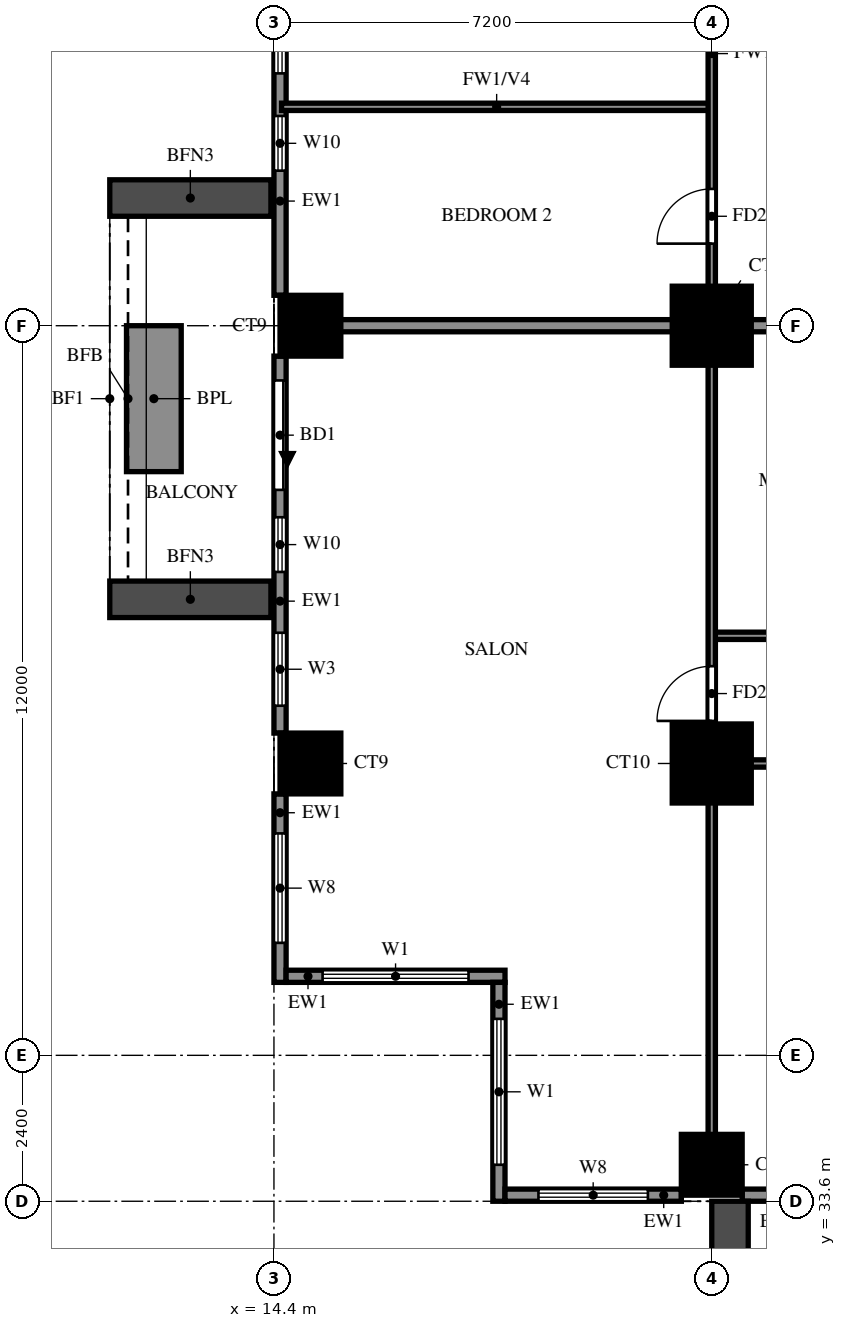
"""IFC4 building model, lengths in metres.
Left out: names, types, materials, properties, quantities, classifications, styles, units other than length and angle.
Written with IfcOpenShell. Run it as: python <this file> out.ifc"""

import sys

from ifc_helpers import new_model, si_unit, direction, frame, frame_2d, origin, origin_2d, place, context, subcontext, project, spatial, rectangle, extrude, source, transform, mapped, element, fill, save


model = new_model("IFC4")
c1 = context("Model", 3, precision=1e-05, world=origin(), true_north=direction((0.0, 1.0)))
c2 = subcontext(c1, "Body", "Model", "MODEL_VIEW")
j1 = project(units=[si_unit("LENGTHUNIT", "METRE"), si_unit("PLANEANGLEUNIT", "RADIAN")], contexts=[c1])
p1 = place(None, origin())
s1 = spatial("IfcSite", under=j1, at=p1, CompositionType="ELEMENT")
p2 = place(p1, origin())
s2 = spatial("IfcBuilding", under=s1, at=p2, CompositionType="ELEMENT")
p3 = place(p2, frame((0.0, 0.0, 65.5)))
s3 = spatial("IfcBuildingStorey", under=s2, at=p3, CompositionType="ELEMENT", Elevation=65.5)
m1 = source(origin(), c2, "Body", "SweptSolid", [
    extrude(rectangle(XDim=1.0, YDim=1.0, at=origin_2d()), origin(), (0.0, 0.0, 1.0), 3.18),
])
for number, where, z_axis, x_axis in (
    (1, (21.6, 34.2, 0.0), (0.0, 0.0, 1.0), (1.0, 0.0, 0.0)),
    (2, (15.0, 40.8, 0.0), (0.0, 0.0, 1.0), (1.0, 0.0, 0.0)),
):
    element("IfcColumn", number, at=place(p3, frame(where, z_axis=z_axis, x_axis=x_axis)), inside=s3, PredefinedType="COLUMN", context=c2, shape_type="MappedRepresentation", body=[
        mapped(m1, transform((0.0, 0.0, 0.0))),
    ])
m2 = source(origin(), c2, "Body", "SweptSolid", [
    extrude(rectangle(XDim=1.3, YDim=1.3, at=origin_2d()), origin(), (0.0, 0.0, 1.0), 3.18),
])
p4 = place(p3, frame((21.6, 40.8, 0.0), z_axis=(0.0, 0.0, 1.0), x_axis=(1.0, 0.0, 0.0)))
e3 = element("IfcColumn", 3, at=p4, inside=s3, PredefinedType="COLUMN", context=c2, shape_type="MappedRepresentation", body=[
    mapped(m2, transform((0.0, 0.0, 0.0))),
])
p5 = place(p3, frame((15.0, 48.0, 0.0), z_axis=(0.0, 0.0, 1.0), x_axis=(1.0, 0.0, 0.0)))
e4 = element("IfcColumn", 4, at=p5, inside=s3, PredefinedType="COLUMN", context=c2, shape_type="MappedRepresentation", body=[
    mapped(m1, transform((0.0, 0.0, 0.0))),
])
p6 = place(p3, frame((21.6, 48.0, 0.0), z_axis=(0.0, 0.0, 1.0), x_axis=(1.0, 0.0, 0.0)))
e5 = element("IfcColumn", 5, at=p6, inside=s3, PredefinedType="COLUMN", context=c2, shape_type="MappedRepresentation", body=[
    mapped(m2, transform((0.0, 0.0, 0.0))),
])
p7 = place(p3, frame((14.5, 54.7, 0.0), z_axis=(0.0, 0.0, 1.0), x_axis=(0.0, -1.0, 0.0)))
e6 = element("IfcWall", 6, at=p7, inside=s3, PredefinedType="SOLIDWALL", context=c2, shape_type="SweptSolid", body=[
    extrude(rectangle(XDim=6.2, YDim=0.2, at=frame_2d((3.1, 0.0))), origin(), (0.0, 0.0, 1.0), 3.18),
])
p8 = place(p7, frame((3.25, 0.0, 0.6)))
e7 = element("IfcOpeningElement", 7, at=p8, cuts=e6, PredefinedType="OPENING", context=c2, shape_type="SweptSolid", body=[
    extrude(rectangle(XDim=0.9, YDim=2.4, at=frame_2d((0.45, 1.2))), frame((0.0, 0.11, 0.0), z_axis=(0.0, -1.0, 0.0), x_axis=(1.0, 0.0, 0.0)), (0.0, 0.0, 1.0), 0.22),
])
p9 = place(p7, frame((0.75, 0.0, 0.6)))
e8 = element("IfcOpeningElement", 8, at=p9, cuts=e6, PredefinedType="OPENING", context=c2, shape_type="SweptSolid", body=[
    extrude(rectangle(XDim=1.8, YDim=2.4, at=frame_2d((0.9, 1.2))), frame((0.0, 0.11, 0.0), z_axis=(0.0, -1.0, 0.0), x_axis=(1.0, 0.0, 0.0)), (0.0, 0.0, 1.0), 0.22),
])
p10 = place(p3, frame((14.5, 47.5, 0.0), z_axis=(0.0, 0.0, 1.0), x_axis=(0.0, -1.0, 0.0)))
e9 = element("IfcWall", 9, at=p10, inside=s3, PredefinedType="SOLIDWALL", context=c2, shape_type="SweptSolid", body=[
    extrude(rectangle(XDim=6.2, YDim=0.2, at=frame_2d((3.1, 0.0))), origin(), (0.0, 0.0, 1.0), 3.18),
])
p11 = place(p10, frame((0.4, 0.0, 0.0)))
e10 = element("IfcOpeningElement", 10, at=p11, cuts=e9, PredefinedType="OPENING", context=c2, shape_type="SweptSolid", body=[
    extrude(rectangle(XDim=1.8, YDim=2.4, at=frame_2d((0.9, 1.2))), frame((0.0, 0.11, 0.0), z_axis=(0.0, -1.0, 0.0), x_axis=(1.0, 0.0, 0.0)), (0.0, 0.0, 1.0), 0.22),
])
p12 = place(p10, frame((2.65, 0.0, 0.6)))
e11 = element("IfcOpeningElement", 11, at=p12, cuts=e9, PredefinedType="OPENING", context=c2, shape_type="SweptSolid", body=[
    extrude(rectangle(XDim=0.9, YDim=2.4, at=frame_2d((0.45, 1.2))), frame((0.0, 0.11, 0.0), z_axis=(0.0, -1.0, 0.0), x_axis=(1.0, 0.0, 0.0)), (0.0, 0.0, 1.0), 0.22),
])
p13 = place(p10, frame((4.55, 0.0, 0.6)))
e12 = element("IfcOpeningElement", 12, at=p13, cuts=e9, PredefinedType="OPENING", context=c2, shape_type="SweptSolid", body=[
    extrude(rectangle(XDim=1.2, YDim=2.4, at=frame_2d((0.6, 1.2))), frame((0.0, 0.11, 0.0), z_axis=(0.0, -1.0, 0.0), x_axis=(1.0, 0.0, 0.0)), (0.0, 0.0, 1.0), 0.22),
])
p14 = place(p3, frame((14.5, 40.3, 0.0), z_axis=(0.0, 0.0, 1.0), x_axis=(0.0, -1.0, 0.0)))
e13 = element("IfcWall", 13, at=p14, inside=s3, PredefinedType="SOLIDWALL", context=c2, shape_type="SweptSolid", body=[
    extrude(rectangle(XDim=3.1, YDim=0.2, at=frame_2d((1.55, 0.0))), origin(), (0.0, 0.0, 1.0), 3.18),
])
p15 = place(p14, frame((0.65, 0.0, 0.6)))
e14 = element("IfcOpeningElement", 14, at=p15, cuts=e13, PredefinedType="OPENING", context=c2, shape_type="SweptSolid", body=[
    extrude(rectangle(XDim=1.8, YDim=2.4, at=frame_2d((0.9, 1.2))), frame((0.0, 0.11, 0.0), z_axis=(0.0, -1.0, 0.0), x_axis=(1.0, 0.0, 0.0)), (0.0, 0.0, 1.0), 0.22),
])
p16 = place(p3, frame((14.6, 37.3, 0.0), z_axis=(0.0, 0.0, 1.0), x_axis=(1.0, 0.0, 0.0)))
e15 = element("IfcWall", 15, at=p16, inside=s3, PredefinedType="SOLIDWALL", context=c2, shape_type="SweptSolid", body=[
    extrude(rectangle(XDim=3.6, YDim=0.2, at=frame_2d((1.8, 0.0))), origin(), (0.0, 0.0, 1.0), 3.18),
])
p17 = place(p16, frame((0.6, 0.0, 0.6)))
e16 = element("IfcOpeningElement", 16, at=p17, cuts=e15, PredefinedType="OPENING", context=c2, shape_type="SweptSolid", body=[
    extrude(rectangle(XDim=2.4, YDim=2.4, at=frame_2d((1.2, 1.2))), frame((0.0, 0.11, 0.0), z_axis=(0.0, -1.0, 0.0), x_axis=(1.0, 0.0, 0.0)), (0.0, 0.0, 1.0), 0.22),
])
p18 = place(p3, frame((18.1, 37.2, 0.0), z_axis=(0.0, 0.0, 1.0), x_axis=(0.0, -1.0, 0.0)))
e17 = element("IfcWall", 17, at=p18, inside=s3, PredefinedType="SOLIDWALL", context=c2, shape_type="SweptSolid", body=[
    extrude(rectangle(XDim=3.6, YDim=0.2, at=frame_2d((1.8, 0.0))), origin(), (0.0, 0.0, 1.0), 3.18),
])
p19 = place(p18, frame((0.6, 0.0, 0.6)))
e18 = element("IfcOpeningElement", 18, at=p19, cuts=e17, PredefinedType="OPENING", context=c2, shape_type="SweptSolid", body=[
    extrude(rectangle(XDim=2.4, YDim=2.4, at=frame_2d((1.2, 1.2))), frame((0.0, 0.11, 0.0), z_axis=(0.0, -1.0, 0.0), x_axis=(1.0, 0.0, 0.0)), (0.0, 0.0, 1.0), 0.22),
])
p20 = place(p3, frame((18.2, 33.7, 0.0), z_axis=(0.0, 0.0, 1.0), x_axis=(1.0, 0.0, 0.0)))
e19 = element("IfcWall", 19, at=p20, inside=s3, PredefinedType="SOLIDWALL", context=c2, shape_type="SweptSolid", body=[
    extrude(rectangle(XDim=2.9, YDim=0.2, at=frame_2d((1.45, 0.0))), origin(), (0.0, 0.0, 1.0), 3.18),
])
p21 = place(p20, frame((0.55, 0.0, 0.6)))
e20 = element("IfcOpeningElement", 20, at=p21, cuts=e19, PredefinedType="OPENING", context=c2, shape_type="SweptSolid", body=[
    extrude(rectangle(XDim=1.8, YDim=2.4, at=frame_2d((0.9, 1.2))), frame((0.0, 0.11, 0.0), z_axis=(0.0, -1.0, 0.0), x_axis=(1.0, 0.0, 0.0)), (0.0, 0.0, 1.0), 0.22),
])
p22 = place(p3, frame((22.1, 33.7, 0.0), z_axis=(0.0, 0.0, 1.0), x_axis=(1.0, 0.0, 0.0)))
e21 = element("IfcWall", 21, at=p22, inside=s3, PredefinedType="SOLIDWALL", context=c2, shape_type="SweptSolid", body=[
    extrude(rectangle(XDim=6.2, YDim=0.2, at=frame_2d((3.1, 0.0))), origin(), (0.0, 0.0, 1.0), 3.18),
])
p23 = place(p22, frame((1.0, 0.0, 0.0)))
e22 = element("IfcOpeningElement", 22, at=p23, cuts=e21, PredefinedType="OPENING", context=c2, shape_type="SweptSolid", body=[
    extrude(rectangle(XDim=1.8, YDim=2.4, at=frame_2d((0.9, 1.2))), frame((0.0, 0.11, 0.0), z_axis=(0.0, -1.0, 0.0), x_axis=(1.0, 0.0, 0.0)), (0.0, 0.0, 1.0), 0.22),
])
p24 = place(p22, frame((3.65, 0.0, 0.6)))
e23 = element("IfcOpeningElement", 23, at=p24, cuts=e21, PredefinedType="OPENING", context=c2, shape_type="SweptSolid", body=[
    extrude(rectangle(XDim=1.8, YDim=2.4, at=frame_2d((0.9, 1.2))), frame((0.0, 0.11, 0.0), z_axis=(0.0, -1.0, 0.0), x_axis=(1.0, 0.0, 0.0)), (0.0, 0.0, 1.0), 0.22),
])
for number, where, z_axis, x_axis in (
    (24, (14.35, 50.1, 0.0), (0.0, 0.0, 1.0), (-1.0, 0.0, 0.0)),
    (25, (14.35, 43.5, 0.0), (0.0, 0.0, 1.0), (-1.0, 0.0, 0.0)),
):
    element("IfcWall", number, at=place(p3, frame(where, z_axis=z_axis, x_axis=x_axis)), inside=s3, PredefinedType="SOLIDWALL", context=c2, shape_type="SweptSolid", body=[
        extrude(rectangle(XDim=2.65, YDim=0.6, at=frame_2d((1.325, 0.0))), origin(), (0.0, 0.0, 1.0), 2.85),
    ])
p25 = place(p3, frame((12.425, 48.0, 0.0), z_axis=(0.0, 0.0, 1.0), x_axis=(0.0, -1.0, 0.0)))
e26 = element("IfcWall", 26, at=p25, inside=s3, PredefinedType="SOLIDWALL", context=c2, shape_type="SweptSolid", body=[
    extrude(rectangle(XDim=2.4, YDim=0.9, at=frame_2d((1.2, 0.0))), origin(), (0.0, 0.0, 1.0), 0.9),
])
p26 = place(p3, frame((21.9, 33.6, 0.0), z_axis=(0.0, 0.0, 1.0), x_axis=(0.0, -1.0, 0.0)))
e27 = element("IfcWall", 27, at=p26, inside=s3, PredefinedType="SOLIDWALL", context=c2, shape_type="SweptSolid", body=[
    extrude(rectangle(XDim=2.7, YDim=0.6, at=frame_2d((1.35, 0.0))), origin(), (0.0, 0.0, 1.0), 2.85),
])
p27 = place(p3, frame((14.525, 48.0, 0.0), z_axis=(0.0, 0.0, 1.0), x_axis=(1.0, 0.0, 0.0)))
e28 = element("IfcWall", 28, at=p27, inside=s3, PredefinedType="SOLIDWALL", context=c2, shape_type="SweptSolid", body=[
    extrude(rectangle(XDim=19.075, YDim=0.2, at=frame_2d((9.538, 0.0))), origin(), (0.0, 0.0, 1.0), 3.18),
])
p28 = place(p3, frame((21.6, 40.8, 0.0), z_axis=(0.0, 0.0, 1.0), x_axis=(1.0, 0.0, 0.0)))
e29 = element("IfcWall", 29, at=p28, inside=s3, PredefinedType="PARTITIONING", context=c2, shape_type="SweptSolid", body=[
    extrude(rectangle(XDim=10.8, YDim=0.12, at=frame_2d((5.4, 0.0))), origin(), (0.0, 0.0, 1.0), 3.18),
])
p29 = place(p28, frame((1.35, 0.0, 0.0)))
e30 = element("IfcOpeningElement", 30, at=p29, cuts=e29, PredefinedType="OPENING", context=c2, shape_type="SweptSolid", body=[
    extrude(rectangle(XDim=0.9, YDim=2.1, at=frame_2d((0.45, 1.05))), frame((0.0, 0.07, 0.0), z_axis=(0.0, -1.0, 0.0), x_axis=(1.0, 0.0, 0.0)), (0.0, 0.0, 1.0), 0.14),
])
p30 = place(p28, frame((4.95, 0.0, 0.0)))
e31 = element("IfcOpeningElement", 31, at=p30, cuts=e29, PredefinedType="OPENING", context=c2, shape_type="SweptSolid", body=[
    extrude(rectangle(XDim=0.9, YDim=2.1, at=frame_2d((0.45, 1.05))), frame((0.0, 0.07, 0.0), z_axis=(0.0, -1.0, 0.0), x_axis=(1.0, 0.0, 0.0)), (0.0, 0.0, 1.0), 0.14),
])
p31 = place(p28, frame((8.55, 0.0, 0.0)))
e32 = element("IfcOpeningElement", 32, at=p31, cuts=e29, PredefinedType="OPENING", context=c2, shape_type="SweptSolid", body=[
    extrude(rectangle(XDim=0.9, YDim=2.1, at=frame_2d((0.45, 1.05))), frame((0.0, 0.07, 0.0), z_axis=(0.0, -1.0, 0.0), x_axis=(1.0, 0.0, 0.0)), (0.0, 0.0, 1.0), 0.14),
])
p32 = place(p3, frame((21.6, 42.9, 0.0), z_axis=(0.0, 0.0, 1.0), x_axis=(1.0, 0.0, 0.0)))
e33 = element("IfcWall", 33, at=p32, inside=s3, PredefinedType="PARTITIONING", context=c2, shape_type="SweptSolid", body=[
    extrude(rectangle(XDim=16.8, YDim=0.12, at=frame_2d((8.4, 0.0))), origin(), (0.0, 0.0, 1.0), 3.18),
])
p33 = place(p32, frame((1.375, 0.0, 0.0)))
e34 = element("IfcOpeningElement", 34, at=p33, cuts=e33, PredefinedType="OPENING", context=c2, shape_type="SweptSolid", body=[
    extrude(rectangle(XDim=0.9, YDim=2.1, at=frame_2d((0.45, 1.05))), frame((0.0, 0.07, 0.0), z_axis=(0.0, -1.0, 0.0), x_axis=(1.0, 0.0, 0.0)), (0.0, 0.0, 1.0), 0.14),
])
p34 = place(p32, frame((5.5, 0.0, 0.0)))
e35 = element("IfcOpeningElement", 35, at=p34, cuts=e33, PredefinedType="OPENING", context=c2, shape_type="SweptSolid", body=[
    extrude(rectangle(XDim=0.9, YDim=2.1, at=frame_2d((0.45, 1.05))), frame((0.0, 0.07, 0.0), z_axis=(0.0, -1.0, 0.0), x_axis=(1.0, 0.0, 0.0)), (0.0, 0.0, 1.0), 0.14),
])
p35 = place(p32, frame((9.725, 0.0, 0.0)))
e36 = element("IfcOpeningElement", 36, at=p35, cuts=e33, PredefinedType="OPENING", context=c2, shape_type="SweptSolid", body=[
    extrude(rectangle(XDim=0.8, YDim=2.1, at=frame_2d((0.4, 1.05))), frame((0.0, 0.07, 0.0), z_axis=(0.0, -1.0, 0.0), x_axis=(1.0, 0.0, 0.0)), (0.0, 0.0, 1.0), 0.14),
])
p36 = place(p32, frame((13.95, 0.0, 0.0)))
e37 = element("IfcOpeningElement", 37, at=p36, cuts=e33, PredefinedType="OPENING", context=c2, shape_type="SweptSolid", body=[
    extrude(rectangle(XDim=0.9, YDim=2.1, at=frame_2d((0.45, 1.05))), frame((0.0, 0.07, 0.0), z_axis=(0.0, -1.0, 0.0), x_axis=(1.0, 0.0, 0.0)), (0.0, 0.0, 1.0), 0.14),
])
p37 = place(p3, frame((14.525, 51.6, 0.0), z_axis=(0.0, 0.0, 1.0), x_axis=(1.0, 0.0, 0.0)))
e38 = element("IfcWall", 38, at=p37, inside=s3, PredefinedType="PARTITIONING", context=c2, shape_type="SweptSolid", body=[
    extrude(rectangle(XDim=7.075, YDim=0.12, at=frame_2d((3.538, 0.0))), origin(), (0.0, 0.0, 1.0), 2.28),
])
p38 = place(p3, frame((21.6, 33.725, 0.0), z_axis=(0.0, 0.0, 1.0), x_axis=(0.0, 1.0, 0.0)))
e39 = element("IfcWall", 39, at=p38, inside=s3, PredefinedType="PARTITIONING", context=c2, shape_type="SweptSolid", body=[
    extrude(rectangle(XDim=39.475, YDim=0.12, at=frame_2d((19.737, 0.0))), origin(), (0.0, 0.0, 1.0), 3.18),
])
p39 = place(p38, frame((7.775, 0.0, 0.0)))
e40 = element("IfcOpeningElement", 40, at=p39, cuts=e39, PredefinedType="OPENING", context=c2, shape_type="SweptSolid", body=[
    extrude(rectangle(XDim=0.9, YDim=2.1, at=frame_2d((0.45, 1.05))), frame((0.0, 0.07, 0.0), z_axis=(0.0, -1.0, 0.0), x_axis=(1.0, 0.0, 0.0)), (0.0, 0.0, 1.0), 0.14),
])
p40 = place(p38, frame((15.625, 0.0, 0.0)))
e41 = element("IfcOpeningElement", 41, at=p40, cuts=e39, PredefinedType="OPENING", context=c2, shape_type="SweptSolid", body=[
    extrude(rectangle(XDim=0.9, YDim=2.1, at=frame_2d((0.45, 1.05))), frame((0.0, 0.07, 0.0), z_axis=(0.0, -1.0, 0.0), x_axis=(1.0, 0.0, 0.0)), (0.0, 0.0, 1.0), 0.14),
])
p41 = place(p38, frame((19.225, 0.0, 0.0)))
e42 = element("IfcOpeningElement", 42, at=p41, cuts=e39, PredefinedType="OPENING", context=c2, shape_type="SweptSolid", body=[
    extrude(rectangle(XDim=0.9, YDim=2.1, at=frame_2d((0.45, 1.05))), frame((0.0, 0.07, 0.0), z_axis=(0.0, -1.0, 0.0), x_axis=(1.0, 0.0, 0.0)), (0.0, 0.0, 1.0), 0.14),
])
p42 = place(p38, frame((24.325, 0.0, 0.0)))
e43 = element("IfcOpeningElement", 43, at=p42, cuts=e39, PredefinedType="OPENING", context=c2, shape_type="SweptSolid", body=[
    extrude(rectangle(XDim=1.5, YDim=2.1, at=frame_2d((0.75, 1.05))), frame((0.0, 0.07, 0.0), z_axis=(0.0, -1.0, 0.0), x_axis=(1.0, 0.0, 0.0)), (0.0, 0.0, 1.0), 0.14),
])
p43 = place(p38, frame((30.025, 0.0, 0.0)))
e44 = element("IfcOpeningElement", 44, at=p43, cuts=e39, PredefinedType="OPENING", context=c2, shape_type="SweptSolid", body=[
    extrude(rectangle(XDim=0.9, YDim=2.1, at=frame_2d((0.45, 1.05))), frame((0.0, 0.07, 0.0), z_axis=(0.0, -1.0, 0.0), x_axis=(1.0, 0.0, 0.0)), (0.0, 0.0, 1.0), 0.14),
])
p44 = place(p38, frame((33.625, 0.0, 0.0)))
e45 = element("IfcOpeningElement", 45, at=p44, cuts=e39, PredefinedType="OPENING", context=c2, shape_type="SweptSolid", body=[
    extrude(rectangle(XDim=0.9, YDim=2.1, at=frame_2d((0.45, 1.05))), frame((0.0, 0.07, 0.0), z_axis=(0.0, -1.0, 0.0), x_axis=(1.0, 0.0, 0.0)), (0.0, 0.0, 1.0), 0.14),
])
p45 = place(p38, frame((37.225, 0.0, 0.0)))
e46 = element("IfcOpeningElement", 46, at=p45, cuts=e39, PredefinedType="OPENING", context=c2, shape_type="SweptSolid", body=[
    extrude(rectangle(XDim=0.9, YDim=2.1, at=frame_2d((0.45, 1.05))), frame((0.0, 0.07, 0.0), z_axis=(0.0, -1.0, 0.0), x_axis=(1.0, 0.0, 0.0)), (0.0, 0.0, 1.0), 0.14),
])
p46 = place(p8, origin())
e47 = element("IfcWindow", 47, at=p46, inside=s3, PartitioningType="SINGLE_PANEL", PredefinedType="WINDOW", context=c2, shape_type="SweptSolid", body=[
    extrude(rectangle(XDim=0.9, YDim=2.4, at=frame_2d((0.45, 1.2))), frame((0.0, 0.03, 0.0), z_axis=(0.0, -1.0, 0.0), x_axis=(1.0, 0.0, 0.0)), (0.0, 0.0, 1.0), 0.06),
])
fill(e7, e47)
p47 = place(p9, origin())
e48 = element("IfcWindow", 48, at=p47, inside=s3, PartitioningType="DOUBLE_PANEL_VERTICAL", PredefinedType="WINDOW", context=c2, shape_type="SweptSolid", body=[
    extrude(rectangle(XDim=1.8, YDim=2.4, at=frame_2d((0.9, 1.2))), frame((0.0, 0.03, 0.0), z_axis=(0.0, -1.0, 0.0), x_axis=(1.0, 0.0, 0.0)), (0.0, 0.0, 1.0), 0.06),
])
fill(e8, e48)
p48 = place(p11, origin())
e49 = element("IfcDoor", 49, at=p48, inside=s3, OperationType="DOUBLE_DOOR_SLIDING", PredefinedType="DOOR", context=c2, shape_type="SweptSolid", body=[
    extrude(rectangle(XDim=1.8, YDim=2.4, at=frame_2d((0.9, 1.2))), frame((0.0, 0.025, 0.0), z_axis=(0.0, -1.0, 0.0), x_axis=(1.0, 0.0, 0.0)), (0.0, 0.0, 1.0), 0.05),
])
fill(e10, e49)
p49 = place(p12, origin())
e50 = element("IfcWindow", 50, at=p49, inside=s3, PartitioningType="SINGLE_PANEL", PredefinedType="WINDOW", context=c2, shape_type="SweptSolid", body=[
    extrude(rectangle(XDim=0.9, YDim=2.4, at=frame_2d((0.45, 1.2))), frame((0.0, 0.03, 0.0), z_axis=(0.0, -1.0, 0.0), x_axis=(1.0, 0.0, 0.0)), (0.0, 0.0, 1.0), 0.06),
])
fill(e11, e50)
p50 = place(p13, origin())
e51 = element("IfcWindow", 51, at=p50, inside=s3, PartitioningType="SINGLE_PANEL", PredefinedType="WINDOW", context=c2, shape_type="SweptSolid", body=[
    extrude(rectangle(XDim=1.2, YDim=2.4, at=frame_2d((0.6, 1.2))), frame((0.0, 0.03, 0.0), z_axis=(0.0, -1.0, 0.0), x_axis=(1.0, 0.0, 0.0)), (0.0, 0.0, 1.0), 0.06),
])
fill(e12, e51)
p51 = place(p15, origin())
e52 = element("IfcWindow", 52, at=p51, inside=s3, PartitioningType="DOUBLE_PANEL_VERTICAL", PredefinedType="WINDOW", context=c2, shape_type="SweptSolid", body=[
    extrude(rectangle(XDim=1.8, YDim=2.4, at=frame_2d((0.9, 1.2))), frame((0.0, 0.03, 0.0), z_axis=(0.0, -1.0, 0.0), x_axis=(1.0, 0.0, 0.0)), (0.0, 0.0, 1.0), 0.06),
])
fill(e14, e52)
p52 = place(p17, origin())
e53 = element("IfcWindow", 53, at=p52, inside=s3, PartitioningType="DOUBLE_PANEL_VERTICAL", PredefinedType="WINDOW", context=c2, shape_type="SweptSolid", body=[
    extrude(rectangle(XDim=2.4, YDim=2.4, at=frame_2d((1.2, 1.2))), frame((0.0, 0.03, 0.0), z_axis=(0.0, -1.0, 0.0), x_axis=(1.0, 0.0, 0.0)), (0.0, 0.0, 1.0), 0.06),
])
fill(e16, e53)
p53 = place(p19, origin())
e54 = element("IfcWindow", 54, at=p53, inside=s3, PartitioningType="DOUBLE_PANEL_VERTICAL", PredefinedType="WINDOW", context=c2, shape_type="SweptSolid", body=[
    extrude(rectangle(XDim=2.4, YDim=2.4, at=frame_2d((1.2, 1.2))), frame((0.0, 0.03, 0.0), z_axis=(0.0, -1.0, 0.0), x_axis=(1.0, 0.0, 0.0)), (0.0, 0.0, 1.0), 0.06),
])
fill(e18, e54)
p54 = place(p21, origin())
e55 = element("IfcWindow", 55, at=p54, inside=s3, PartitioningType="DOUBLE_PANEL_VERTICAL", PredefinedType="WINDOW", context=c2, shape_type="SweptSolid", body=[
    extrude(rectangle(XDim=1.8, YDim=2.4, at=frame_2d((0.9, 1.2))), frame((0.0, 0.03, 0.0), z_axis=(0.0, -1.0, 0.0), x_axis=(1.0, 0.0, 0.0)), (0.0, 0.0, 1.0), 0.06),
])
fill(e20, e55)
p55 = place(p39, origin())
e56 = element("IfcDoor", 56, at=p55, inside=s3, OperationType="SINGLE_SWING_RIGHT", PredefinedType="DOOR", context=c2, shape_type="SweptSolid", body=[
    extrude(rectangle(XDim=0.9, YDim=2.1, at=frame_2d((0.45, 1.05))), frame((0.0, 0.025, 0.0), z_axis=(0.0, -1.0, 0.0), x_axis=(1.0, 0.0, 0.0)), (0.0, 0.0, 1.0), 0.05),
])
fill(e40, e56)
p56 = place(p40, origin())
e57 = element("IfcDoor", 57, at=p56, inside=s3, OperationType="SINGLE_SWING_LEFT", PredefinedType="DOOR", context=c2, shape_type="SweptSolid", body=[
    extrude(rectangle(XDim=0.9, YDim=2.1, at=frame_2d((0.45, 1.05))), frame((0.0, 0.025, 0.0), z_axis=(0.0, -1.0, 0.0), x_axis=(1.0, 0.0, 0.0)), (0.0, 0.0, 1.0), 0.05),
])
fill(e41, e57)
save(model, sys.argv[1])
